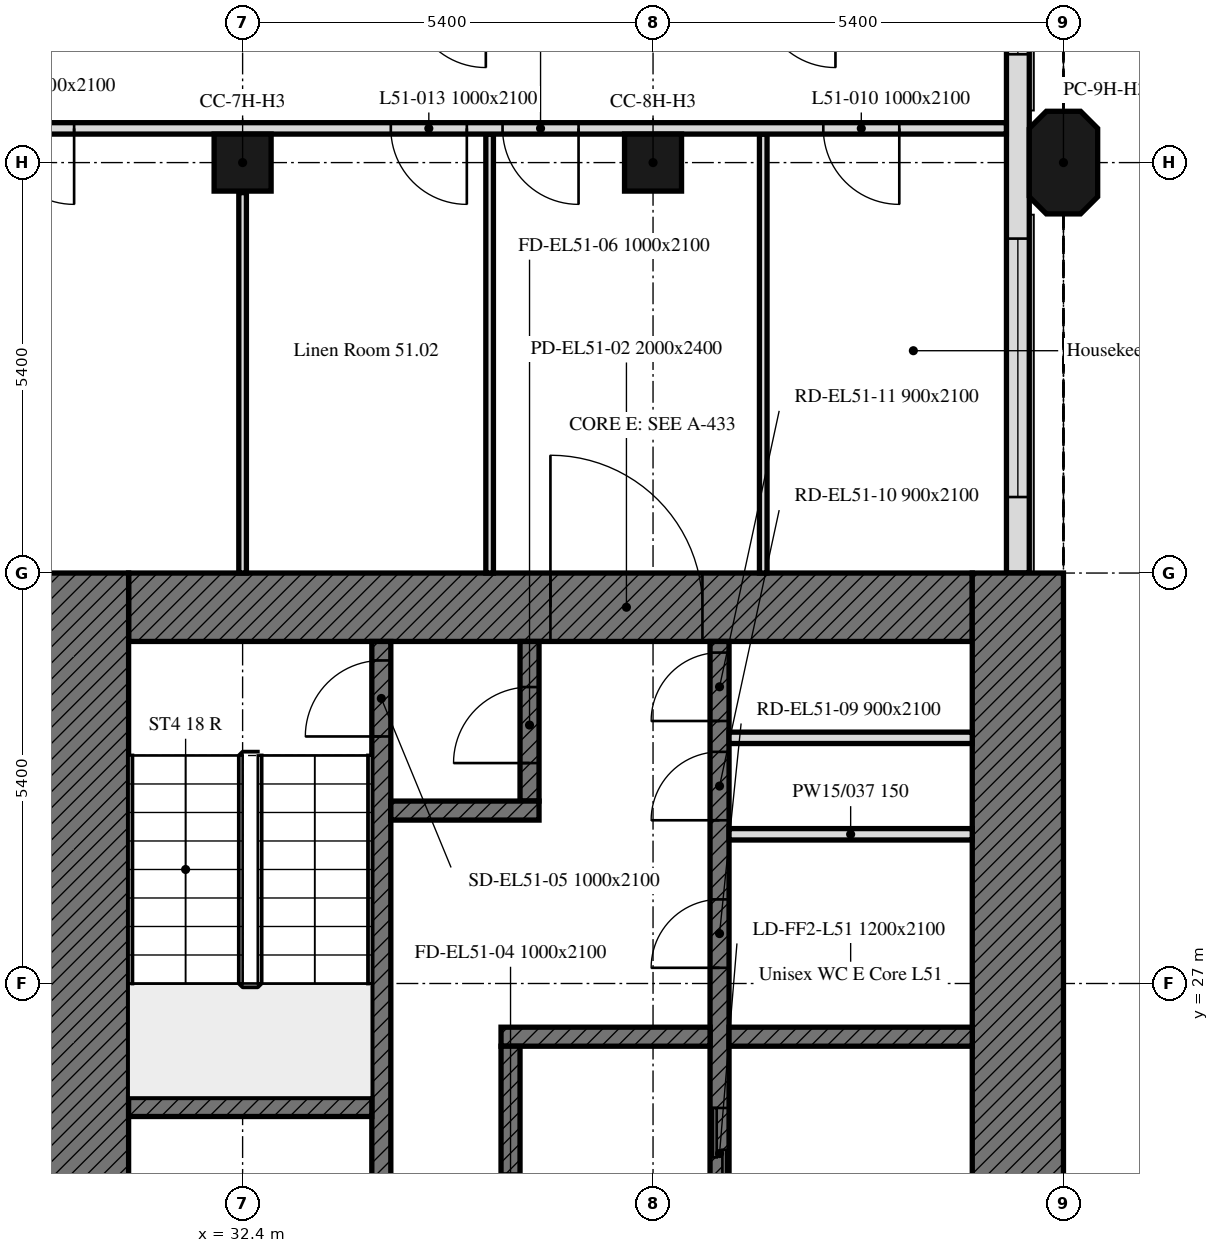
"""IFC4 building model, lengths in metres.
Left out: names, types, materials, properties, quantities, classifications, styles, units other than length and angle.
Written with IfcOpenShell. Run it as: python <this file> out.ifc"""

import sys

from ifc_helpers import new_model, si_unit, direction, frame, frame_2d, origin, origin_2d, place, context, subcontext, project, spatial, polyline, rectangle, outline, extrude, element, fill, save


model = new_model("IFC4")
c1 = context("Model", 3, precision=1e-05, world=origin(), true_north=direction((0.0, 1.0)))
c2 = subcontext(c1, "Body", "Model", "MODEL_VIEW")
j1 = project(units=[si_unit("LENGTHUNIT", "METRE"), si_unit("PLANEANGLEUNIT", "RADIAN")], contexts=[c1])
p1 = place(None, origin())
s1 = spatial("IfcSite", under=j1, at=p1, CompositionType="ELEMENT")
p2 = place(p1, origin())
s2 = spatial("IfcBuilding", under=s1, at=p2, CompositionType="ELEMENT")
p3 = place(p2, frame((0.0, 0.0, 207.1)))
s3 = spatial("IfcBuildingStorey", under=s2, at=p3, CompositionType="ELEMENT", Elevation=207.1)
for number, where, z_axis, x_axis in (
    (1, (32.4, 37.8, 0.0), (0.0, 0.0, 1.0), (1.0, 0.0, 0.0)),
    (2, (37.8, 37.8, 0.0), (0.0, 0.0, 1.0), (1.0, 0.0, 0.0)),
):
    element("IfcColumn", number, at=place(p3, frame(where, z_axis=z_axis, x_axis=x_axis)), inside=s3, PredefinedType="COLUMN", context=c2, shape_type="SweptSolid", body=[
        extrude(rectangle(XDim=0.75, YDim=0.75, at=origin_2d()), origin(), (0.0, 0.0, 1.0), 3.0),
    ])
p4 = place(p3, frame((43.2, 37.8, 0.0), z_axis=(0.0, 0.0, 1.0), x_axis=(0.0, 1.0, 0.0)))
e3 = element("IfcColumn", 3, at=p4, inside=s3, PredefinedType="COLUMN", context=c2, shape_type="SweptSolid", body=[
    extrude(outline(polyline([(-0.45, -0.45), (0.45, -0.45), (0.675, -0.225), (0.675, 0.225), (0.45, 0.45), (-0.45, 0.45), (-0.675, 0.225), (-0.675, -0.225), (-0.45, -0.45)])), origin(), (0.0, 0.0, 1.0), 3.0),
])
p5 = place(p3, frame((42.6, 32.4, 0.0), z_axis=(0.0, 0.0, 1.0), x_axis=(0.0, 1.0, 0.0)))
e4 = element("IfcWall", 4, at=p5, inside=s3, PredefinedType="SOLIDWALL", context=c2, shape_type="SweptSolid", body=[
    extrude(rectangle(XDim=10.614, YDim=0.3, at=frame_2d((5.307, 0.0))), origin(), (0.0, 0.0, 1.0), 3.0),
])
p6 = place(p5, frame((1.0, 0.0, 0.9)))
e5 = element("IfcOpeningElement", 5, at=p6, cuts=e4, PredefinedType="OPENING", context=c2, shape_type="SweptSolid", body=[
    extrude(rectangle(XDim=3.4, YDim=1.7, at=frame_2d((1.7, 0.85))), frame((0.0, 0.16, 0.0), z_axis=(0.0, -1.0, 0.0), x_axis=(1.0, 0.0, 0.0)), (0.0, 0.0, 1.0), 0.32),
])
p7 = place(p5, frame((6.825, 0.0, 0.9)))
e6 = element("IfcOpeningElement", 6, at=p7, cuts=e4, PredefinedType="OPENING", context=c2, shape_type="SweptSolid", body=[
    extrude(rectangle(XDim=0.65, YDim=1.7, at=frame_2d((0.325, 0.85))), frame((0.0, 0.16, 0.0), z_axis=(0.0, -1.0, 0.0), x_axis=(1.0, 0.0, 0.0)), (0.0, 0.0, 1.0), 0.32),
])
p8 = place(p5, frame((8.35, 0.0, 0.9)))
e7 = element("IfcOpeningElement", 7, at=p8, cuts=e4, PredefinedType="OPENING", context=c2, shape_type="SweptSolid", body=[
    extrude(rectangle(XDim=1.1, YDim=1.7, at=frame_2d((0.55, 0.85))), frame((0.0, 0.16, 0.0), z_axis=(0.0, -1.0, 0.0), x_axis=(1.0, 0.0, 0.0)), (0.0, 0.0, 1.0), 0.32),
])
p9 = place(p3, frame((30.9, 31.95, 0.0), z_axis=(0.0, 0.0, 1.0), x_axis=(1.0, 0.0, 0.0)))
e8 = element("IfcWall", 8, at=p9, inside=s3, PredefinedType="SOLIDWALL", context=c2, shape_type="SweptSolid", body=[
    extrude(rectangle(XDim=11.1, YDim=0.9, at=frame_2d((5.55, 0.0))), origin(), (0.0, 0.0, 1.0), 3.0),
])
p10 = place(p9, frame((5.55, 0.0, 0.0)))
e9 = element("IfcOpeningElement", 9, at=p10, cuts=e8, PredefinedType="OPENING", context=c2, shape_type="SweptSolid", body=[
    extrude(rectangle(XDim=2.0, YDim=2.4, at=frame_2d((1.0, 1.2))), frame((0.0, 0.45, 0.0), z_axis=(0.0, -1.0, 0.0), x_axis=(1.0, 0.0, 0.0)), (0.0, 0.0, 1.0), 0.9),
])
for number, where, z_axis, x_axis in (
    (10, (42.6, 32.4, 0.0), (0.0, 0.0, 1.0), (0.0, -1.0, 0.0)),
    (11, (30.3, 16.2, 0.0), (0.0, 0.0, 1.0), (0.0, 1.0, 0.0)),
):
    element("IfcWall", number, at=place(p3, frame(where, z_axis=z_axis, x_axis=x_axis)), inside=s3, PredefinedType="SOLIDWALL", context=c2, shape_type="SweptSolid", body=[
        extrude(rectangle(XDim=16.2, YDim=1.2, at=frame_2d((8.1, 0.0))), origin(), (0.0, 0.0, 1.0), 3.0),
    ])
p11 = place(p3, frame((38.675, 17.1, 0.0), z_axis=(0.0, 0.0, 1.0), x_axis=(0.0, 1.0, 0.0)))
e12 = element("IfcWall", 12, at=p11, inside=s3, PredefinedType="SOLIDWALL", context=c2, shape_type="SweptSolid", body=[
    extrude(rectangle(XDim=14.4, YDim=0.25, at=frame_2d((7.2, 0.0))), origin(), (0.0, 0.0, 1.0), 3.0),
])
p12 = place(p11, frame((4.6, 0.0, 0.0)))
e13 = element("IfcOpeningElement", 13, at=p12, cuts=e12, PredefinedType="OPENING", context=c2, shape_type="SweptSolid", body=[
    extrude(rectangle(XDim=1.0, YDim=2.1, at=frame_2d((0.5, 1.05))), frame((0.0, 0.125, 0.0), z_axis=(0.0, -1.0, 0.0), x_axis=(1.0, 0.0, 0.0)), (0.0, 0.0, 1.0), 0.25),
])
p13 = place(p11, frame((7.062, 0.0, 0.0)))
e14 = element("IfcOpeningElement", 14, at=p13, cuts=e12, PredefinedType="OPENING", context=c2, shape_type="SweptSolid", body=[
    extrude(rectangle(XDim=1.2, YDim=2.1, at=frame_2d((0.6, 1.05))), frame((0.0, 0.125, 0.0), z_axis=(0.0, -1.0, 0.0), x_axis=(1.0, 0.0, 0.0)), (0.0, 0.0, 1.0), 0.25),
])
p14 = place(p11, frame((10.106, 0.0, 0.0)))
e15 = element("IfcOpeningElement", 15, at=p14, cuts=e12, PredefinedType="OPENING", context=c2, shape_type="SweptSolid", body=[
    extrude(rectangle(XDim=0.9, YDim=2.1, at=frame_2d((0.45, 1.05))), frame((0.0, 0.125, 0.0), z_axis=(0.0, -1.0, 0.0), x_axis=(1.0, 0.0, 0.0)), (0.0, 0.0, 1.0), 0.25),
])
p15 = place(p11, frame((12.048, 0.0, 0.0)))
e16 = element("IfcOpeningElement", 16, at=p15, cuts=e12, PredefinedType="OPENING", context=c2, shape_type="SweptSolid", body=[
    extrude(rectangle(XDim=0.9, YDim=2.1, at=frame_2d((0.45, 1.05))), frame((0.0, 0.125, 0.0), z_axis=(0.0, -1.0, 0.0), x_axis=(1.0, 0.0, 0.0)), (0.0, 0.0, 1.0), 0.25),
])
p16 = place(p11, frame((13.354, 0.0, 0.0)))
e17 = element("IfcOpeningElement", 17, at=p16, cuts=e12, PredefinedType="OPENING", context=c2, shape_type="SweptSolid", body=[
    extrude(rectangle(XDim=0.9, YDim=2.1, at=frame_2d((0.45, 1.05))), frame((0.0, 0.125, 0.0), z_axis=(0.0, -1.0, 0.0), x_axis=(1.0, 0.0, 0.0)), (0.0, 0.0, 1.0), 0.25),
])
p17 = place(p3, frame((34.225, 17.1, 0.0), z_axis=(0.0, 0.0, 1.0), x_axis=(0.0, 1.0, 0.0)))
e18 = element("IfcWall", 18, at=p17, inside=s3, PredefinedType="SOLIDWALL", context=c2, shape_type="SweptSolid", body=[
    extrude(rectangle(XDim=14.4, YDim=0.25, at=frame_2d((7.2, 0.0))), origin(), (0.0, 0.0, 1.0), 3.0),
])
p18 = place(p17, frame((13.15, 0.0, 0.0)))
e19 = element("IfcOpeningElement", 19, at=p18, cuts=e18, PredefinedType="OPENING", context=c2, shape_type="SweptSolid", body=[
    extrude(rectangle(XDim=1.0, YDim=2.1, at=frame_2d((0.5, 1.05))), frame((0.0, 0.125, 0.0), z_axis=(0.0, -1.0, 0.0), x_axis=(1.0, 0.0, 0.0)), (0.0, 0.0, 1.0), 0.25),
])
p19 = place(p17, frame((0.6, 0.0, 0.0)))
e20 = element("IfcOpeningElement", 20, at=p19, cuts=e18, PredefinedType="OPENING", context=c2, shape_type="SweptSolid", body=[
    extrude(rectangle(XDim=1.1, YDim=2.1, at=frame_2d((0.55, 1.05))), frame((0.0, 0.125, 0.0), z_axis=(0.0, -1.0, 0.0), x_axis=(1.0, 0.0, 0.0)), (0.0, 0.0, 1.0), 0.25),
])
p20 = place(p17, frame((3.25, 0.0, 0.0)))
e21 = element("IfcOpeningElement", 21, at=p20, cuts=e18, PredefinedType="OPENING", context=c2, shape_type="SweptSolid", body=[
    extrude(rectangle(XDim=0.9, YDim=2.1, at=frame_2d((0.45, 1.05))), frame((0.0, 0.125, 0.0), z_axis=(0.0, -1.0, 0.0), x_axis=(1.0, 0.0, 0.0)), (0.0, 0.0, 1.0), 0.25),
])
p21 = place(p3, frame((30.9, 25.375, 0.0), z_axis=(0.0, 0.0, 1.0), x_axis=(1.0, 0.0, 0.0)))
e22 = element("IfcWall", 22, at=p21, inside=s3, PredefinedType="SOLIDWALL", context=c2, shape_type="SweptSolid", body=[
    extrude(rectangle(XDim=3.2, YDim=0.25, at=frame_2d((1.6, 0.0))), origin(), (0.0, 0.0, 1.0), 3.0),
])
p22 = place(p3, frame((38.8, 26.3, 0.0), z_axis=(0.0, 0.0, 1.0), x_axis=(1.0, 0.0, 0.0)))
e23 = element("IfcWall", 23, at=p22, inside=s3, PredefinedType="SOLIDWALL", context=c2, shape_type="SweptSolid", body=[
    extrude(rectangle(XDim=3.2, YDim=0.25, at=frame_2d((1.6, 0.0))), origin(), (0.0, 0.0, 1.0), 3.0),
])
p23 = place(p3, frame((35.8, 26.3, 0.0), z_axis=(0.0, 0.0, 1.0), x_axis=(1.0, 0.0, 0.0)))
e24 = element("IfcWall", 24, at=p23, inside=s3, PredefinedType="SOLIDWALL", context=c2, shape_type="SweptSolid", body=[
    extrude(rectangle(XDim=2.75, YDim=0.25, at=frame_2d((1.375, 0.0))), origin(), (0.0, 0.0, 1.0), 3.0),
])
p24 = place(p3, frame((36.175, 29.4, 0.0), z_axis=(0.0, 0.0, 1.0), x_axis=(0.0, 1.0, 0.0)))
e25 = element("IfcWall", 25, at=p24, inside=s3, PredefinedType="SOLIDWALL", context=c2, shape_type="SweptSolid", body=[
    extrude(rectangle(XDim=2.1, YDim=0.25, at=frame_2d((1.05, 0.0))), origin(), (0.0, 0.0, 1.0), 3.0),
])
p25 = place(p24, frame((0.5, 0.0, 0.0)))
e26 = element("IfcOpeningElement", 26, at=p25, cuts=e25, PredefinedType="OPENING", context=c2, shape_type="SweptSolid", body=[
    extrude(rectangle(XDim=1.0, YDim=2.1, at=frame_2d((0.5, 1.05))), frame((0.0, 0.125, 0.0), z_axis=(0.0, -1.0, 0.0), x_axis=(1.0, 0.0, 0.0)), (0.0, 0.0, 1.0), 0.25),
])
p26 = place(p3, frame((34.35, 29.275, 0.0), z_axis=(0.0, 0.0, 1.0), x_axis=(1.0, 0.0, 0.0)))
e27 = element("IfcWall", 27, at=p26, inside=s3, PredefinedType="SOLIDWALL", context=c2, shape_type="SweptSolid", body=[
    extrude(rectangle(XDim=1.95, YDim=0.25, at=frame_2d((0.975, 0.0))), origin(), (0.0, 0.0, 1.0), 3.0),
])
p27 = place(p3, frame((35.925, 20.55, 0.0), z_axis=(0.0, 0.0, 1.0), x_axis=(0.0, 1.0, 0.0)))
e28 = element("IfcWall", 28, at=p27, inside=s3, PredefinedType="SOLIDWALL", context=c2, shape_type="SweptSolid", body=[
    extrude(rectangle(XDim=5.625, YDim=0.25, at=frame_2d((2.812, 0.0))), origin(), (0.0, 0.0, 1.0), 3.0),
])
p28 = place(p27, frame((2.95, 0.0, 0.0)))
e29 = element("IfcOpeningElement", 29, at=p28, cuts=e28, PredefinedType="OPENING", context=c2, shape_type="SweptSolid", body=[
    extrude(rectangle(XDim=1.0, YDim=2.1, at=frame_2d((0.5, 1.05))), frame((0.0, 0.125, 0.0), z_axis=(0.0, -1.0, 0.0), x_axis=(1.0, 0.0, 0.0)), (0.0, 0.0, 1.0), 0.25),
])
for number, where, z_axis, x_axis in (
    (30, (38.8, 28.963, 0.0), (0.0, 0.0, 1.0), (1.0, 0.0, 0.0)),
    (31, (38.8, 30.232, 0.0), (0.0, 0.0, 1.0), (1.0, 0.0, 0.0)),
):
    element("IfcWall", number, at=place(p3, frame(where, z_axis=z_axis, x_axis=x_axis)), inside=s3, PredefinedType="PARTITIONING", context=c2, shape_type="SweptSolid", body=[
        extrude(rectangle(XDim=3.2, YDim=0.15, at=frame_2d((1.6, 0.0))), origin(), (0.0, 0.0, 1.0), 3.0),
    ])
p29 = place(p3, frame((32.4, 32.4, 0.0), z_axis=(0.0, 0.0, 1.0), x_axis=(0.0, 1.0, 0.0)))
e32 = element("IfcWall", 32, at=p29, inside=s3, PredefinedType="PARTITIONING", context=c2, shape_type="SweptSolid", body=[
    extrude(rectangle(XDim=5.005, YDim=0.1, at=frame_2d((2.502, 0.0))), origin(), (0.0, 0.0, 1.0), 2.4),
])
for number, where, z_axis, x_axis in (
    (33, (39.25, 32.4, 0.0), (0.0, 0.0, 1.0), (0.0, 1.0, 0.0)),
    (34, (35.65, 38.175, 0.0), (0.0, 0.0, 1.0), (0.0, -1.0, 0.0)),
):
    element("IfcWall", number, at=place(p3, frame(where, z_axis=z_axis, x_axis=x_axis)), inside=s3, PredefinedType="PARTITIONING", context=c2, shape_type="SweptSolid", body=[
        extrude(rectangle(XDim=5.775, YDim=0.1, at=frame_2d((2.888, 0.0))), origin(), (0.0, 0.0, 1.0), 3.0),
    ])
p30 = place(p3, frame((42.449, 38.25, 0.0), z_axis=(0.0, 0.0, 1.0), x_axis=(-1.0, 0.0, 0.0)))
e35 = element("IfcWall", 35, at=p30, inside=s3, PredefinedType="PARTITIONING", context=c2, shape_type="SweptSolid", body=[
    extrude(rectangle(XDim=37.049, YDim=0.15, at=frame_2d((18.524, 0.0))), origin(), (0.0, 0.0, 1.0), 2.4),
])
p31 = place(p30, frame((12.266, 0.0, 0.0)))
e36 = element("IfcOpeningElement", 36, at=p31, cuts=e35, PredefinedType="OPENING", context=c2, shape_type="SweptSolid", body=[
    extrude(rectangle(XDim=1.0, YDim=2.1, at=frame_2d((0.5, 1.05))), frame((0.0, 0.075, 0.0), z_axis=(0.0, -1.0, 0.0), x_axis=(1.0, 0.0, 0.0)), (0.0, 0.0, 1.0), 0.15),
])
p32 = place(p30, frame((23.049, 0.0, 0.0)))
e37 = element("IfcOpeningElement", 37, at=p32, cuts=e35, PredefinedType="OPENING", context=c2, shape_type="SweptSolid", body=[
    extrude(rectangle(XDim=1.0, YDim=2.1, at=frame_2d((0.5, 1.05))), frame((0.0, 0.075, 0.0), z_axis=(0.0, -1.0, 0.0), x_axis=(1.0, 0.0, 0.0)), (0.0, 0.0, 1.0), 0.15),
])
p33 = place(p30, frame((1.409, 0.0, 0.0)))
e38 = element("IfcOpeningElement", 38, at=p33, cuts=e35, PredefinedType="OPENING", context=c2, shape_type="SweptSolid", body=[
    extrude(rectangle(XDim=1.0, YDim=2.1, at=frame_2d((0.5, 1.05))), frame((0.0, 0.075, 0.0), z_axis=(0.0, -1.0, 0.0), x_axis=(1.0, 0.0, 0.0)), (0.0, 0.0, 1.0), 0.15),
])
p34 = place(p30, frame((28.199, 0.0, 0.0)))
e39 = element("IfcOpeningElement", 39, at=p34, cuts=e35, PredefinedType="OPENING", context=c2, shape_type="SweptSolid", body=[
    extrude(rectangle(XDim=1.0, YDim=2.1, at=frame_2d((0.5, 1.05))), frame((0.0, 0.075, 0.0), z_axis=(0.0, -1.0, 0.0), x_axis=(1.0, 0.0, 0.0)), (0.0, 0.0, 1.0), 0.15),
])
p35 = place(p30, frame((7.099, 0.0, 0.0)))
e40 = element("IfcOpeningElement", 40, at=p35, cuts=e35, PredefinedType="OPENING", context=c2, shape_type="SweptSolid", body=[
    extrude(rectangle(XDim=1.0, YDim=2.1, at=frame_2d((0.5, 1.05))), frame((0.0, 0.075, 0.0), z_axis=(0.0, -1.0, 0.0), x_axis=(1.0, 0.0, 0.0)), (0.0, 0.0, 1.0), 0.15),
])
p36 = place(p30, frame((5.629, 0.0, 0.0)))
e41 = element("IfcOpeningElement", 41, at=p36, cuts=e35, PredefinedType="OPENING", context=c2, shape_type="SweptSolid", body=[
    extrude(rectangle(XDim=1.0, YDim=2.1, at=frame_2d((0.5, 1.05))), frame((0.0, 0.075, 0.0), z_axis=(0.0, -1.0, 0.0), x_axis=(1.0, 0.0, 0.0)), (0.0, 0.0, 1.0), 0.15),
])
p37 = place(p30, frame((29.669, 0.0, 0.0)))
e42 = element("IfcOpeningElement", 42, at=p37, cuts=e35, PredefinedType="OPENING", context=c2, shape_type="SweptSolid", body=[
    extrude(rectangle(XDim=1.0, YDim=2.1, at=frame_2d((0.5, 1.05))), frame((0.0, 0.075, 0.0), z_axis=(0.0, -1.0, 0.0), x_axis=(1.0, 0.0, 0.0)), (0.0, 0.0, 1.0), 0.15),
])
p38 = place(p6, origin())
e43 = element("IfcWindow", 43, at=p38, inside=s3, PartitioningType="SINGLE_PANEL", PredefinedType="WINDOW", context=c2, shape_type="SweptSolid", body=[
    extrude(rectangle(XDim=3.4, YDim=1.7, at=frame_2d((1.7, 0.85))), frame((0.0, 0.03, 0.0), z_axis=(0.0, -1.0, 0.0), x_axis=(1.0, 0.0, 0.0)), (0.0, 0.0, 1.0), 0.06),
])
fill(e5, e43)
p39 = place(p7, origin())
e44 = element("IfcWindow", 44, at=p39, inside=s3, PartitioningType="SINGLE_PANEL", PredefinedType="WINDOW", context=c2, shape_type="SweptSolid", body=[
    extrude(rectangle(XDim=0.65, YDim=1.7, at=frame_2d((0.325, 0.85))), frame((0.0, 0.03, 0.0), z_axis=(0.0, -1.0, 0.0), x_axis=(1.0, 0.0, 0.0)), (0.0, 0.0, 1.0), 0.06),
])
fill(e6, e44)
p40 = place(p10, origin())
e45 = element("IfcDoor", 45, at=p40, inside=s3, OperationType="DOUBLE_DOOR_SINGLE_SWING", PredefinedType="DOOR", context=c2, shape_type="SweptSolid", body=[
    extrude(rectangle(XDim=2.0, YDim=2.4, at=frame_2d((1.0, 1.2))), frame((0.0, 0.025, 0.0), z_axis=(0.0, -1.0, 0.0), x_axis=(1.0, 0.0, 0.0)), (0.0, 0.0, 1.0), 0.05),
])
fill(e9, e45)
p41 = place(p18, origin())
e46 = element("IfcDoor", 46, at=p41, inside=s3, OperationType="SINGLE_SWING_LEFT", PredefinedType="DOOR", context=c2, shape_type="SweptSolid", body=[
    extrude(rectangle(XDim=1.0, YDim=2.1, at=frame_2d((0.5, 1.05))), frame((0.0, 0.025, 0.0), z_axis=(0.0, -1.0, 0.0), x_axis=(1.0, 0.0, 0.0)), (0.0, 0.0, 1.0), 0.05),
])
fill(e19, e46)
p42 = place(p25, origin())
e47 = element("IfcDoor", 47, at=p42, inside=s3, OperationType="SINGLE_SWING_LEFT", PredefinedType="DOOR", context=c2, shape_type="SweptSolid", body=[
    extrude(rectangle(XDim=1.0, YDim=2.1, at=frame_2d((0.5, 1.05))), frame((0.0, 0.025, 0.0), z_axis=(0.0, -1.0, 0.0), x_axis=(1.0, 0.0, 0.0)), (0.0, 0.0, 1.0), 0.05),
])
fill(e26, e47)
p43 = place(p13, origin())
e48 = element("IfcDoor", 48, at=p43, inside=s3, OperationType="DOUBLE_DOOR_SLIDING", PredefinedType="DOOR", context=c2, shape_type="SweptSolid", body=[
    extrude(rectangle(XDim=1.2, YDim=2.1, at=frame_2d((0.6, 1.05))), frame((0.0, 0.025, 0.0), z_axis=(0.0, -1.0, 0.0), x_axis=(1.0, 0.0, 0.0)), (0.0, 0.0, 1.0), 0.05),
])
fill(e14, e48)
p44 = place(p14, origin())
e49 = element("IfcDoor", 49, at=p44, inside=s3, OperationType="SINGLE_SWING_LEFT", PredefinedType="DOOR", context=c2, shape_type="SweptSolid", body=[
    extrude(rectangle(XDim=0.9, YDim=2.1, at=frame_2d((0.45, 1.05))), frame((0.0, 0.025, 0.0), z_axis=(0.0, -1.0, 0.0), x_axis=(1.0, 0.0, 0.0)), (0.0, 0.0, 1.0), 0.05),
])
fill(e15, e49)
p45 = place(p15, origin())
e50 = element("IfcDoor", 50, at=p45, inside=s3, OperationType="SINGLE_SWING_LEFT", PredefinedType="DOOR", context=c2, shape_type="SweptSolid", body=[
    extrude(rectangle(XDim=0.9, YDim=2.1, at=frame_2d((0.45, 1.05))), frame((0.0, 0.025, 0.0), z_axis=(0.0, -1.0, 0.0), x_axis=(1.0, 0.0, 0.0)), (0.0, 0.0, 1.0), 0.05),
])
fill(e16, e50)
p46 = place(p16, origin())
e51 = element("IfcDoor", 51, at=p46, inside=s3, OperationType="SINGLE_SWING_LEFT", PredefinedType="DOOR", context=c2, shape_type="SweptSolid", body=[
    extrude(rectangle(XDim=0.9, YDim=2.1, at=frame_2d((0.45, 1.05))), frame((0.0, 0.025, 0.0), z_axis=(0.0, -1.0, 0.0), x_axis=(1.0, 0.0, 0.0)), (0.0, 0.0, 1.0), 0.05),
])
fill(e17, e51)
p47 = place(p31, origin())
e52 = element("IfcDoor", 52, at=p47, inside=s3, OperationType="SINGLE_SWING_LEFT", PredefinedType="DOOR", context=c2, shape_type="SweptSolid", body=[
    extrude(rectangle(XDim=1.0, YDim=2.1, at=frame_2d((0.5, 1.05))), frame((0.0, 0.025, 0.0), z_axis=(0.0, -1.0, 0.0), x_axis=(1.0, 0.0, 0.0)), (0.0, 0.0, 1.0), 0.05),
])
fill(e36, e52)
p48 = place(p33, origin())
e53 = element("IfcDoor", 53, at=p48, inside=s3, OperationType="SINGLE_SWING_RIGHT", PredefinedType="DOOR", context=c2, shape_type="SweptSolid", body=[
    extrude(rectangle(XDim=1.0, YDim=2.1, at=frame_2d((0.5, 1.05))), frame((0.0, 0.025, 0.0), z_axis=(0.0, -1.0, 0.0), x_axis=(1.0, 0.0, 0.0)), (0.0, 0.0, 1.0), 0.05),
])
fill(e38, e53)
p49 = place(p35, origin())
e54 = element("IfcDoor", 54, at=p49, inside=s3, OperationType="SINGLE_SWING_LEFT", PredefinedType="DOOR", context=c2, shape_type="SweptSolid", body=[
    extrude(rectangle(XDim=1.0, YDim=2.1, at=frame_2d((0.5, 1.05))), frame((0.0, 0.025, 0.0), z_axis=(0.0, -1.0, 0.0), x_axis=(1.0, 0.0, 0.0)), (0.0, 0.0, 1.0), 0.05),
])
fill(e40, e54)
p50 = place(p36, origin())
e55 = element("IfcDoor", 55, at=p50, inside=s3, OperationType="SINGLE_SWING_LEFT", PredefinedType="DOOR", context=c2, shape_type="SweptSolid", body=[
    extrude(rectangle(XDim=1.0, YDim=2.1, at=frame_2d((0.5, 1.05))), frame((0.0, 0.025, 0.0), z_axis=(0.0, -1.0, 0.0), x_axis=(1.0, 0.0, 0.0)), (0.0, 0.0, 1.0), 0.05),
])
fill(e41, e55)
save(model, sys.argv[1])
